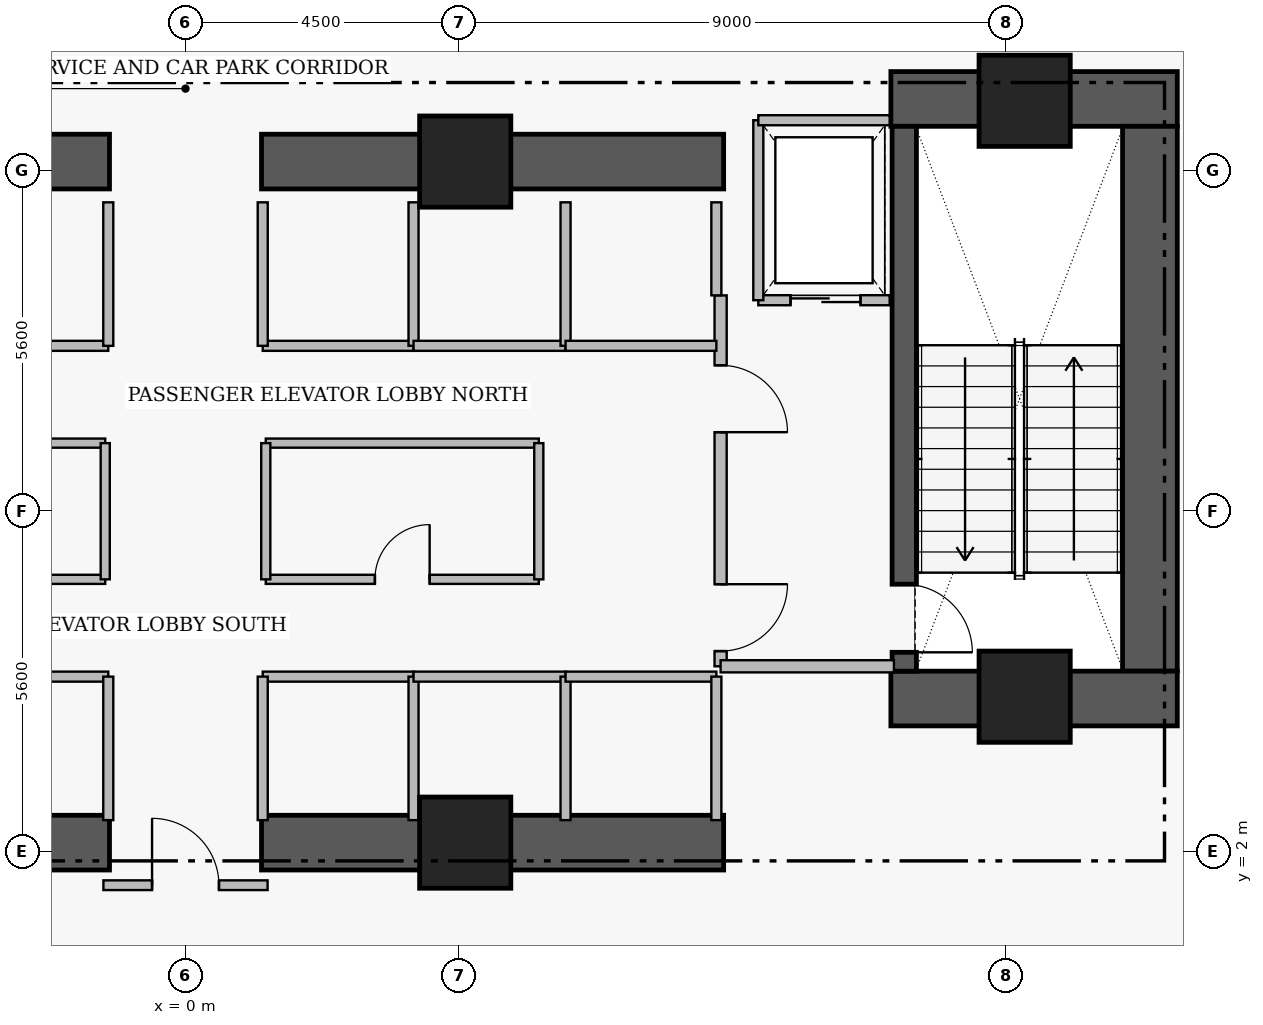
"""IFC4 building model, lengths in metres.
Left out: names, types, materials, properties, quantities, classifications, styles, units other than length and angle.
Written with IfcOpenShell. Run it as: python <this file> out.ifc"""

import sys

from ifc_helpers import new_model, si_unit, direction, frame, frame_2d, origin, origin_2d, place, context, subcontext, project, spatial, rectangle, extrude, element, fill, save


model = new_model("IFC4")
c1 = context("Model", 3, precision=1e-05, world=origin(), true_north=direction((0.0, 1.0)))
c2 = subcontext(c1, "Body", "Model", "MODEL_VIEW")
j1 = project(units=[si_unit("LENGTHUNIT", "METRE"), si_unit("PLANEANGLEUNIT", "RADIAN")], contexts=[c1])
p1 = place(None, origin())
s1 = spatial("IfcSite", under=j1, at=p1, CompositionType="ELEMENT")
p2 = place(p1, origin())
s2 = spatial("IfcBuilding", under=s1, at=p2, CompositionType="ELEMENT")
p3 = place(p2, frame((0.0, 0.0, -4.5)))
s3 = spatial("IfcBuildingStorey", under=s2, at=p3, CompositionType="ELEMENT", Elevation=-4.5)
p4 = place(p3, frame((11.6, 14.38, 0.0), z_axis=(0.0, 0.0, 1.0), x_axis=(1.0, 0.0, 0.0)))
e1 = element("IfcWall", 1, at=p4, inside=s3, PredefinedType="SHEAR", context=c2, shape_type="SweptSolid", body=[
    extrude(rectangle(XDim=4.71, YDim=0.9, at=frame_2d((2.355, 0.0))), origin(), (0.0, 0.0, 1.0), 4.31),
])
p5 = place(p3, frame((15.86, 4.97, 0.0), z_axis=(0.0, 0.0, 1.0), x_axis=(0.0, 1.0, 0.0)))
e2 = element("IfcWall", 2, at=p5, inside=s3, PredefinedType="SHEAR", context=c2, shape_type="SweptSolid", body=[
    extrude(rectangle(XDim=8.96, YDim=0.9, at=frame_2d((4.48, 0.0))), origin(), (0.0, 0.0, 1.0), 4.31),
])
p6 = place(p3, frame((11.6, 4.52, 0.0), z_axis=(0.0, 0.0, 1.0), x_axis=(1.0, 0.0, 0.0)))
e3 = element("IfcWall", 3, at=p6, inside=s3, PredefinedType="SHEAR", context=c2, shape_type="SweptSolid", body=[
    extrude(rectangle(XDim=4.71, YDim=0.9, at=frame_2d((2.355, 0.0))), origin(), (0.0, 0.0, 1.0), 4.31),
])
for number, where, z_axis, x_axis in (
    (4, (-8.85, 2.15, 0.0), (0.0, 0.0, 1.0), (1.0, 0.0, 0.0)),
    (5, (1.25, 2.15, 0.0), (0.0, 0.0, 1.0), (1.0, 0.0, 0.0)),
    (6, (-8.85, 13.35, 0.0), (0.0, 0.0, 1.0), (1.0, 0.0, 0.0)),
    (7, (1.25, 13.35, 0.0), (0.0, 0.0, 1.0), (1.0, 0.0, 0.0)),
):
    element("IfcWall", number, at=place(p3, frame(where, z_axis=z_axis, x_axis=x_axis)), inside=s3, PredefinedType="SHEAR", context=c2, shape_type="SweptSolid", body=[
        extrude(rectangle(XDim=7.6, YDim=0.9, at=frame_2d((3.8, 0.0))), origin(), (0.0, 0.0, 1.0), 4.24),
    ])
p7 = place(p3, frame((11.82, 13.93, 0.0), z_axis=(0.0, 0.0, 1.0), x_axis=(0.0, -1.0, 0.0)))
e8 = element("IfcWall", 8, at=p7, inside=s3, PredefinedType="SHEAR", context=c2, shape_type="SweptSolid", body=[
    extrude(rectangle(XDim=8.96, YDim=0.4, at=frame_2d((4.48, 0.0))), origin(), (0.0, 0.0, 1.0), 4.31),
])
p8 = place(p7, frame((7.53, 0.0, 0.0)))
e9 = element("IfcOpeningElement", 9, at=p8, cuts=e8, PredefinedType="OPENING", context=c2, shape_type="SweptSolid", body=[
    extrude(rectangle(XDim=1.12, YDim=2.22, at=frame_2d((0.56, 1.11))), frame((0.0, 0.21, 0.0), z_axis=(0.0, -1.0, 0.0), x_axis=(1.0, 0.0, 0.0)), (0.0, 0.0, 1.0), 0.42),
])
for number, where, z_axis, x_axis in (
    (10, (4.6, 13.35, 0.0), (0.0, 0.0, 1.0), (1.0, 0.0, 0.0)),
    (11, (13.8, 14.35, 0.0), (0.0, 0.0, 1.0), (1.0, 0.0, 0.0)),
    (12, (4.6, 2.15, 0.0), (0.0, 0.0, 1.0), (1.0, 0.0, 0.0)),
    (13, (13.8, 4.55, 0.0), (0.0, 0.0, 1.0), (1.0, 0.0, 0.0)),
):
    element("IfcColumn", number, at=place(p3, frame(where, z_axis=z_axis, x_axis=x_axis)), inside=s3, PredefinedType="COLUMN", context=c2, shape_type="SweptSolid", body=[
        extrude(rectangle(XDim=1.5, YDim=1.5, at=origin_2d()), origin(), (0.0, 0.0, 1.0), 4.5),
    ])
p9 = place(p3, frame((8.8, 11.15, 0.0), z_axis=(0.0, 0.0, 1.0), x_axis=(0.0, -1.0, 0.0)))
e14 = element("IfcWall", 14, at=p9, inside=s3, PredefinedType="PARTITIONING", context=c2, shape_type="SweptSolid", body=[
    extrude(rectangle(XDim=6.1, YDim=0.2, at=frame_2d((3.05, 0.0))), origin(), (0.0, 0.0, 1.0), 4.24),
])
p10 = place(p9, frame((1.15, 0.0, 0.0)))
e15 = element("IfcOpeningElement", 15, at=p10, cuts=e14, PredefinedType="OPENING", context=c2, shape_type="SweptSolid", body=[
    extrude(rectangle(XDim=1.1, YDim=2.2, at=frame_2d((0.55, 1.1))), frame((0.0, 0.11, 0.0), z_axis=(0.0, -1.0, 0.0), x_axis=(1.0, 0.0, 0.0)), (0.0, 0.0, 1.0), 0.22),
])
p11 = place(p9, frame((4.75, 0.0, 0.0)))
e16 = element("IfcOpeningElement", 16, at=p11, cuts=e14, PredefinedType="OPENING", context=c2, shape_type="SweptSolid", body=[
    extrude(rectangle(XDim=1.1, YDim=2.2, at=frame_2d((0.55, 1.1))), frame((0.0, 0.11, 0.0), z_axis=(0.0, -1.0, 0.0), x_axis=(1.0, 0.0, 0.0)), (0.0, 0.0, 1.0), 0.22),
])
p12 = place(p3, frame((9.42, 11.07, 0.0), z_axis=(0.0, 0.0, 1.0), x_axis=(1.0, 0.0, 0.0)))
e17 = element("IfcWall", 17, at=p12, inside=s3, PredefinedType="PARTITIONING", context=c2, shape_type="SweptSolid", body=[
    extrude(rectangle(XDim=2.16, YDim=0.165, at=frame_2d((1.08, 0.0))), origin(), (0.0, 0.0, 1.0), 4.24),
])
p13 = place(p12, frame((0.53, 0.0, 0.0)))
e18 = element("IfcOpeningElement", 18, at=p13, cuts=e17, PredefinedType="OPENING", context=c2, shape_type="SweptSolid", body=[
    extrude(rectangle(XDim=1.15, YDim=2.25, at=frame_2d((0.575, 1.125))), frame((0.0, 0.093, 0.0), z_axis=(0.0, -1.0, 0.0), x_axis=(1.0, 0.0, 0.0)), (0.0, 0.0, 1.0), 0.185),
])
p14 = place(p3, frame((-4.93, 8.72, 0.0), z_axis=(0.0, 0.0, 1.0), x_axis=(1.0, 0.0, 0.0)))
e19 = element("IfcWall", 19, at=p14, inside=s3, PredefinedType="PARTITIONING", context=c2, shape_type="SweptSolid", body=[
    extrude(rectangle(XDim=3.61, YDim=0.15, at=frame_2d((1.805, 0.0))), origin(), (0.0, 0.0, 1.0), 4.24),
])
p15 = place(p14, frame((1.355, 0.0, 0.0)))
e20 = element("IfcOpeningElement", 20, at=p15, cuts=e19, PredefinedType="OPENING", context=c2, shape_type="SweptSolid", body=[
    extrude(rectangle(XDim=0.9, YDim=2.15, at=frame_2d((0.45, 1.075))), frame((0.0, 0.085, 0.0), z_axis=(0.0, -1.0, 0.0), x_axis=(1.0, 0.0, 0.0)), (0.0, 0.0, 1.0), 0.17),
])
p16 = place(p3, frame((1.32, 6.48, 0.0), z_axis=(0.0, 0.0, 1.0), x_axis=(1.0, 0.0, 0.0)))
e21 = element("IfcWall", 21, at=p16, inside=s3, PredefinedType="PARTITIONING", context=c2, shape_type="SweptSolid", body=[
    extrude(rectangle(XDim=4.49, YDim=0.15, at=frame_2d((2.245, 0.0))), origin(), (0.0, 0.0, 1.0), 4.24),
])
p17 = place(p16, frame((1.795, 0.0, 0.0)))
e22 = element("IfcOpeningElement", 22, at=p17, cuts=e21, PredefinedType="OPENING", context=c2, shape_type="SweptSolid", body=[
    extrude(rectangle(XDim=0.9, YDim=2.15, at=frame_2d((0.45, 1.075))), frame((0.0, 0.085, 0.0), z_axis=(0.0, -1.0, 0.0), x_axis=(1.0, 0.0, 0.0)), (0.0, 0.0, 1.0), 0.17),
])
p18 = place(p3, frame((-1.35, 1.45, 0.0), z_axis=(0.0, 0.0, 1.0), x_axis=(1.0, 0.0, 0.0)))
e23 = element("IfcWall", 23, at=p18, inside=s3, PredefinedType="PARTITIONING", context=c2, shape_type="SweptSolid", body=[
    extrude(rectangle(XDim=2.7, YDim=0.16, at=frame_2d((1.35, 0.0))), origin(), (0.0, 0.0, 1.0), 4.24),
])
p19 = place(p18, frame((0.8, 0.0, 0.0)))
e24 = element("IfcOpeningElement", 24, at=p19, cuts=e23, PredefinedType="OPENING", context=c2, shape_type="SweptSolid", body=[
    extrude(rectangle(XDim=1.1, YDim=2.2, at=frame_2d((0.55, 1.1))), frame((0.0, 0.09, 0.0), z_axis=(0.0, -1.0, 0.0), x_axis=(1.0, 0.0, 0.0)), (0.0, 0.0, 1.0), 0.18),
])
p20 = place(p3, frame((8.8, 5.05, 0.0), z_axis=(0.0, 0.0, 1.0), x_axis=(1.0, 0.0, 0.0)))
e25 = element("IfcWall", 25, at=p20, inside=s3, PredefinedType="PARTITIONING", context=c2, shape_type="SweptSolid", body=[
    extrude(rectangle(XDim=2.85, YDim=0.2, at=frame_2d((1.425, 0.0))), origin(), (0.0, 0.0, 1.0), 4.24),
])
p21 = place(p3, frame((9.42, 11.07, 0.0), z_axis=(0.0, 0.0, 1.0), x_axis=(0.0, 1.0, 0.0)))
e26 = element("IfcWall", 26, at=p21, inside=s3, PredefinedType="PARTITIONING", context=c2, shape_type="SweptSolid", body=[
    extrude(rectangle(XDim=2.96, YDim=0.165, at=frame_2d((1.48, 0.0))), origin(), (0.0, 0.0, 1.0), 4.24),
])
p22 = place(p3, frame((9.42, 14.03, 0.0), z_axis=(0.0, 0.0, 1.0), x_axis=(1.0, 0.0, 0.0)))
e27 = element("IfcWall", 27, at=p22, inside=s3, PredefinedType="PARTITIONING", context=c2, shape_type="SweptSolid", body=[
    extrude(rectangle(XDim=2.16, YDim=0.165, at=frame_2d((1.08, 0.0))), origin(), (0.0, 0.0, 1.0), 4.24),
])
p23 = place(p3, frame((-3.75, 4.88, 0.0), z_axis=(0.0, 0.0, 1.0), x_axis=(1.0, 0.0, 0.0)))
e28 = element("IfcWall", 28, at=p23, inside=s3, PredefinedType="PARTITIONING", context=c2, shape_type="SweptSolid", body=[
    extrude(rectangle(XDim=2.48, YDim=0.165, at=frame_2d((1.24, 0.0))), origin(), (0.0, 0.0, 1.0), 4.24),
])
p24 = place(p3, frame((-1.27, 2.52, 0.0), z_axis=(0.0, 0.0, 1.0), x_axis=(0.0, 1.0, 0.0)))
e29 = element("IfcWall", 29, at=p24, inside=s3, PredefinedType="PARTITIONING", context=c2, shape_type="SweptSolid", body=[
    extrude(rectangle(XDim=2.36, YDim=0.165, at=frame_2d((1.18, 0.0))), origin(), (0.0, 0.0, 1.0), 4.24),
])
p25 = place(p3, frame((1.27, 4.88, 0.0), z_axis=(0.0, 0.0, 1.0), x_axis=(1.0, 0.0, 0.0)))
e30 = element("IfcWall", 30, at=p25, inside=s3, PredefinedType="PARTITIONING", context=c2, shape_type="SweptSolid", body=[
    extrude(rectangle(XDim=2.48, YDim=0.165, at=frame_2d((1.24, 0.0))), origin(), (0.0, 0.0, 1.0), 4.24),
])
for number, where, z_axis, x_axis in (
    (31, (1.27, 2.52, 0.0), (0.0, 0.0, 1.0), (0.0, 1.0, 0.0)),
    (32, (3.75, 2.52, 0.0), (0.0, 0.0, 1.0), (0.0, 1.0, 0.0)),
):
    element("IfcWall", number, at=place(p3, frame(where, z_axis=z_axis, x_axis=x_axis)), inside=s3, PredefinedType="PARTITIONING", context=c2, shape_type="SweptSolid", body=[
        extrude(rectangle(XDim=2.36, YDim=0.165, at=frame_2d((1.18, 0.0))), origin(), (0.0, 0.0, 1.0), 4.24),
    ])
p26 = place(p3, frame((-3.75, 10.32, 0.0), z_axis=(0.0, 0.0, 1.0), x_axis=(1.0, 0.0, 0.0)))
e33 = element("IfcWall", 33, at=p26, inside=s3, PredefinedType="PARTITIONING", context=c2, shape_type="SweptSolid", body=[
    extrude(rectangle(XDim=2.48, YDim=0.165, at=frame_2d((1.24, 0.0))), origin(), (0.0, 0.0, 1.0), 4.24),
])
p27 = place(p3, frame((-1.27, 10.32, 0.0), z_axis=(0.0, 0.0, 1.0), x_axis=(0.0, 1.0, 0.0)))
e34 = element("IfcWall", 34, at=p27, inside=s3, PredefinedType="PARTITIONING", context=c2, shape_type="SweptSolid", body=[
    extrude(rectangle(XDim=2.36, YDim=0.165, at=frame_2d((1.18, 0.0))), origin(), (0.0, 0.0, 1.0), 4.24),
])
p28 = place(p3, frame((1.27, 10.32, 0.0), z_axis=(0.0, 0.0, 1.0), x_axis=(1.0, 0.0, 0.0)))
e35 = element("IfcWall", 35, at=p28, inside=s3, PredefinedType="PARTITIONING", context=c2, shape_type="SweptSolid", body=[
    extrude(rectangle(XDim=2.48, YDim=0.165, at=frame_2d((1.24, 0.0))), origin(), (0.0, 0.0, 1.0), 4.24),
])
for number, where, z_axis, x_axis in (
    (36, (1.27, 10.32, 0.0), (0.0, 0.0, 1.0), (0.0, 1.0, 0.0)),
    (37, (3.75, 10.32, 0.0), (0.0, 0.0, 1.0), (0.0, 1.0, 0.0)),
):
    element("IfcWall", number, at=place(p3, frame(where, z_axis=z_axis, x_axis=x_axis)), inside=s3, PredefinedType="PARTITIONING", context=c2, shape_type="SweptSolid", body=[
        extrude(rectangle(XDim=2.36, YDim=0.165, at=frame_2d((1.18, 0.0))), origin(), (0.0, 0.0, 1.0), 4.24),
    ])
p29 = place(p3, frame((3.75, 4.88, 0.0), z_axis=(0.0, 0.0, 1.0), x_axis=(1.0, 0.0, 0.0)))
e38 = element("IfcWall", 38, at=p29, inside=s3, PredefinedType="PARTITIONING", context=c2, shape_type="SweptSolid", body=[
    extrude(rectangle(XDim=2.5, YDim=0.165, at=frame_2d((1.25, 0.0))), origin(), (0.0, 0.0, 1.0), 4.24),
])
p30 = place(p3, frame((6.25, 2.52, 0.0), z_axis=(0.0, 0.0, 1.0), x_axis=(0.0, 1.0, 0.0)))
e39 = element("IfcWall", 39, at=p30, inside=s3, PredefinedType="PARTITIONING", context=c2, shape_type="SweptSolid", body=[
    extrude(rectangle(XDim=2.36, YDim=0.165, at=frame_2d((1.18, 0.0))), origin(), (0.0, 0.0, 1.0), 4.24),
])
p31 = place(p3, frame((6.25, 4.88, 0.0), z_axis=(0.0, 0.0, 1.0), x_axis=(1.0, 0.0, 0.0)))
e40 = element("IfcWall", 40, at=p31, inside=s3, PredefinedType="PARTITIONING", context=c2, shape_type="SweptSolid", body=[
    extrude(rectangle(XDim=2.48, YDim=0.165, at=frame_2d((1.24, 0.0))), origin(), (0.0, 0.0, 1.0), 4.24),
])
p32 = place(p3, frame((8.73, 2.52, 0.0), z_axis=(0.0, 0.0, 1.0), x_axis=(0.0, 1.0, 0.0)))
e41 = element("IfcWall", 41, at=p32, inside=s3, PredefinedType="PARTITIONING", context=c2, shape_type="SweptSolid", body=[
    extrude(rectangle(XDim=2.36, YDim=0.165, at=frame_2d((1.18, 0.0))), origin(), (0.0, 0.0, 1.0), 4.24),
])
p33 = place(p3, frame((3.75, 10.32, 0.0), z_axis=(0.0, 0.0, 1.0), x_axis=(1.0, 0.0, 0.0)))
e42 = element("IfcWall", 42, at=p33, inside=s3, PredefinedType="PARTITIONING", context=c2, shape_type="SweptSolid", body=[
    extrude(rectangle(XDim=2.5, YDim=0.165, at=frame_2d((1.25, 0.0))), origin(), (0.0, 0.0, 1.0), 4.24),
])
p34 = place(p3, frame((6.25, 10.32, 0.0), z_axis=(0.0, 0.0, 1.0), x_axis=(0.0, 1.0, 0.0)))
e43 = element("IfcWall", 43, at=p34, inside=s3, PredefinedType="PARTITIONING", context=c2, shape_type="SweptSolid", body=[
    extrude(rectangle(XDim=2.36, YDim=0.165, at=frame_2d((1.18, 0.0))), origin(), (0.0, 0.0, 1.0), 4.24),
])
p35 = place(p3, frame((6.25, 10.32, 0.0), z_axis=(0.0, 0.0, 1.0), x_axis=(1.0, 0.0, 0.0)))
e44 = element("IfcWall", 44, at=p35, inside=s3, PredefinedType="PARTITIONING", context=c2, shape_type="SweptSolid", body=[
    extrude(rectangle(XDim=2.48, YDim=0.165, at=frame_2d((1.24, 0.0))), origin(), (0.0, 0.0, 1.0), 4.24),
])
p36 = place(p3, frame((8.73, 11.15, 0.0), z_axis=(0.0, 0.0, 1.0), x_axis=(0.0, 1.0, 0.0)))
e45 = element("IfcWall", 45, at=p36, inside=s3, PredefinedType="PARTITIONING", context=c2, shape_type="SweptSolid", body=[
    extrude(rectangle(XDim=1.53, YDim=0.165, at=frame_2d((0.765, 0.0))), origin(), (0.0, 0.0, 1.0), 4.24),
])
p37 = place(p3, frame((-4.93, 6.48, 0.0), z_axis=(0.0, 0.0, 1.0), x_axis=(1.0, 0.0, 0.0)))
e46 = element("IfcWall", 46, at=p37, inside=s3, PredefinedType="PARTITIONING", context=c2, shape_type="SweptSolid", body=[
    extrude(rectangle(XDim=3.61, YDim=0.15, at=frame_2d((1.805, 0.0))), origin(), (0.0, 0.0, 1.0), 4.24),
])
p38 = place(p3, frame((-1.32, 6.48, 0.0), z_axis=(0.0, 0.0, 1.0), x_axis=(0.0, 1.0, 0.0)))
e47 = element("IfcWall", 47, at=p38, inside=s3, PredefinedType="PARTITIONING", context=c2, shape_type="SweptSolid", body=[
    extrude(rectangle(XDim=2.24, YDim=0.15, at=frame_2d((1.12, 0.0))), origin(), (0.0, 0.0, 1.0), 4.24),
])
p39 = place(p3, frame((1.32, 8.72, 0.0), z_axis=(0.0, 0.0, 1.0), x_axis=(1.0, 0.0, 0.0)))
e48 = element("IfcWall", 48, at=p39, inside=s3, PredefinedType="PARTITIONING", context=c2, shape_type="SweptSolid", body=[
    extrude(rectangle(XDim=4.49, YDim=0.15, at=frame_2d((2.245, 0.0))), origin(), (0.0, 0.0, 1.0), 4.24),
])
for number, where, z_axis, x_axis in (
    (49, (1.32, 6.48, 0.0), (0.0, 0.0, 1.0), (0.0, 1.0, 0.0)),
    (50, (5.81, 6.48, 0.0), (0.0, 0.0, 1.0), (0.0, 1.0, 0.0)),
):
    element("IfcWall", number, at=place(p3, frame(where, z_axis=z_axis, x_axis=x_axis)), inside=s3, PredefinedType="PARTITIONING", context=c2, shape_type="SweptSolid", body=[
        extrude(rectangle(XDim=2.24, YDim=0.15, at=frame_2d((1.12, 0.0))), origin(), (0.0, 0.0, 1.0), 4.24),
    ])
p40 = place(p8, origin())
e51 = element("IfcDoor", 51, at=p40, inside=s3, OperationType="SINGLE_SWING_RIGHT", PredefinedType="DOOR", context=c2, shape_type="SweptSolid", body=[
    extrude(rectangle(XDim=1.12, YDim=2.22, at=frame_2d((0.56, 1.11))), frame((0.0, 0.025, 0.0), z_axis=(0.0, -1.0, 0.0), x_axis=(1.0, 0.0, 0.0)), (0.0, 0.0, 1.0), 0.05),
])
fill(e9, e51)
p41 = place(p10, origin())
e52 = element("IfcDoor", 52, at=p41, inside=s3, OperationType="SINGLE_SWING_RIGHT", PredefinedType="DOOR", context=c2, shape_type="SweptSolid", body=[
    extrude(rectangle(XDim=1.1, YDim=2.2, at=frame_2d((0.55, 1.1))), frame((0.0, 0.025, 0.0), z_axis=(0.0, -1.0, 0.0), x_axis=(1.0, 0.0, 0.0)), (0.0, 0.0, 1.0), 0.05),
])
fill(e15, e52)
p42 = place(p11, origin())
e53 = element("IfcDoor", 53, at=p42, inside=s3, OperationType="SINGLE_SWING_LEFT", PredefinedType="DOOR", context=c2, shape_type="SweptSolid", body=[
    extrude(rectangle(XDim=1.1, YDim=2.2, at=frame_2d((0.55, 1.1))), frame((0.0, 0.025, 0.0), z_axis=(0.0, -1.0, 0.0), x_axis=(1.0, 0.0, 0.0)), (0.0, 0.0, 1.0), 0.05),
])
fill(e16, e53)
p43 = place(p13, origin())
e54 = element("IfcDoor", 54, at=p43, inside=s3, OperationType="SLIDING_TO_LEFT", PredefinedType="DOOR", context=c2, shape_type="SweptSolid", body=[
    extrude(rectangle(XDim=1.15, YDim=2.25, at=frame_2d((0.575, 1.125))), frame((0.0, 0.025, 0.0), z_axis=(0.0, -1.0, 0.0), x_axis=(1.0, 0.0, 0.0)), (0.0, 0.0, 1.0), 0.05),
])
fill(e18, e54)
p44 = place(p17, origin())
e55 = element("IfcDoor", 55, at=p44, inside=s3, OperationType="SINGLE_SWING_RIGHT", PredefinedType="DOOR", context=c2, shape_type="SweptSolid", body=[
    extrude(rectangle(XDim=0.9, YDim=2.15, at=frame_2d((0.45, 1.075))), frame((0.0, 0.025, 0.0), z_axis=(0.0, -1.0, 0.0), x_axis=(1.0, 0.0, 0.0)), (0.0, 0.0, 1.0), 0.05),
])
fill(e22, e55)
p45 = place(p19, origin())
e56 = element("IfcDoor", 56, at=p45, inside=s3, OperationType="SINGLE_SWING_LEFT", PredefinedType="DOOR", context=c2, shape_type="SweptSolid", body=[
    extrude(rectangle(XDim=1.1, YDim=2.2, at=frame_2d((0.55, 1.1))), frame((0.0, 0.025, 0.0), z_axis=(0.0, -1.0, 0.0), x_axis=(1.0, 0.0, 0.0)), (0.0, 0.0, 1.0), 0.05),
])
fill(e24, e56)
save(model, sys.argv[1])
